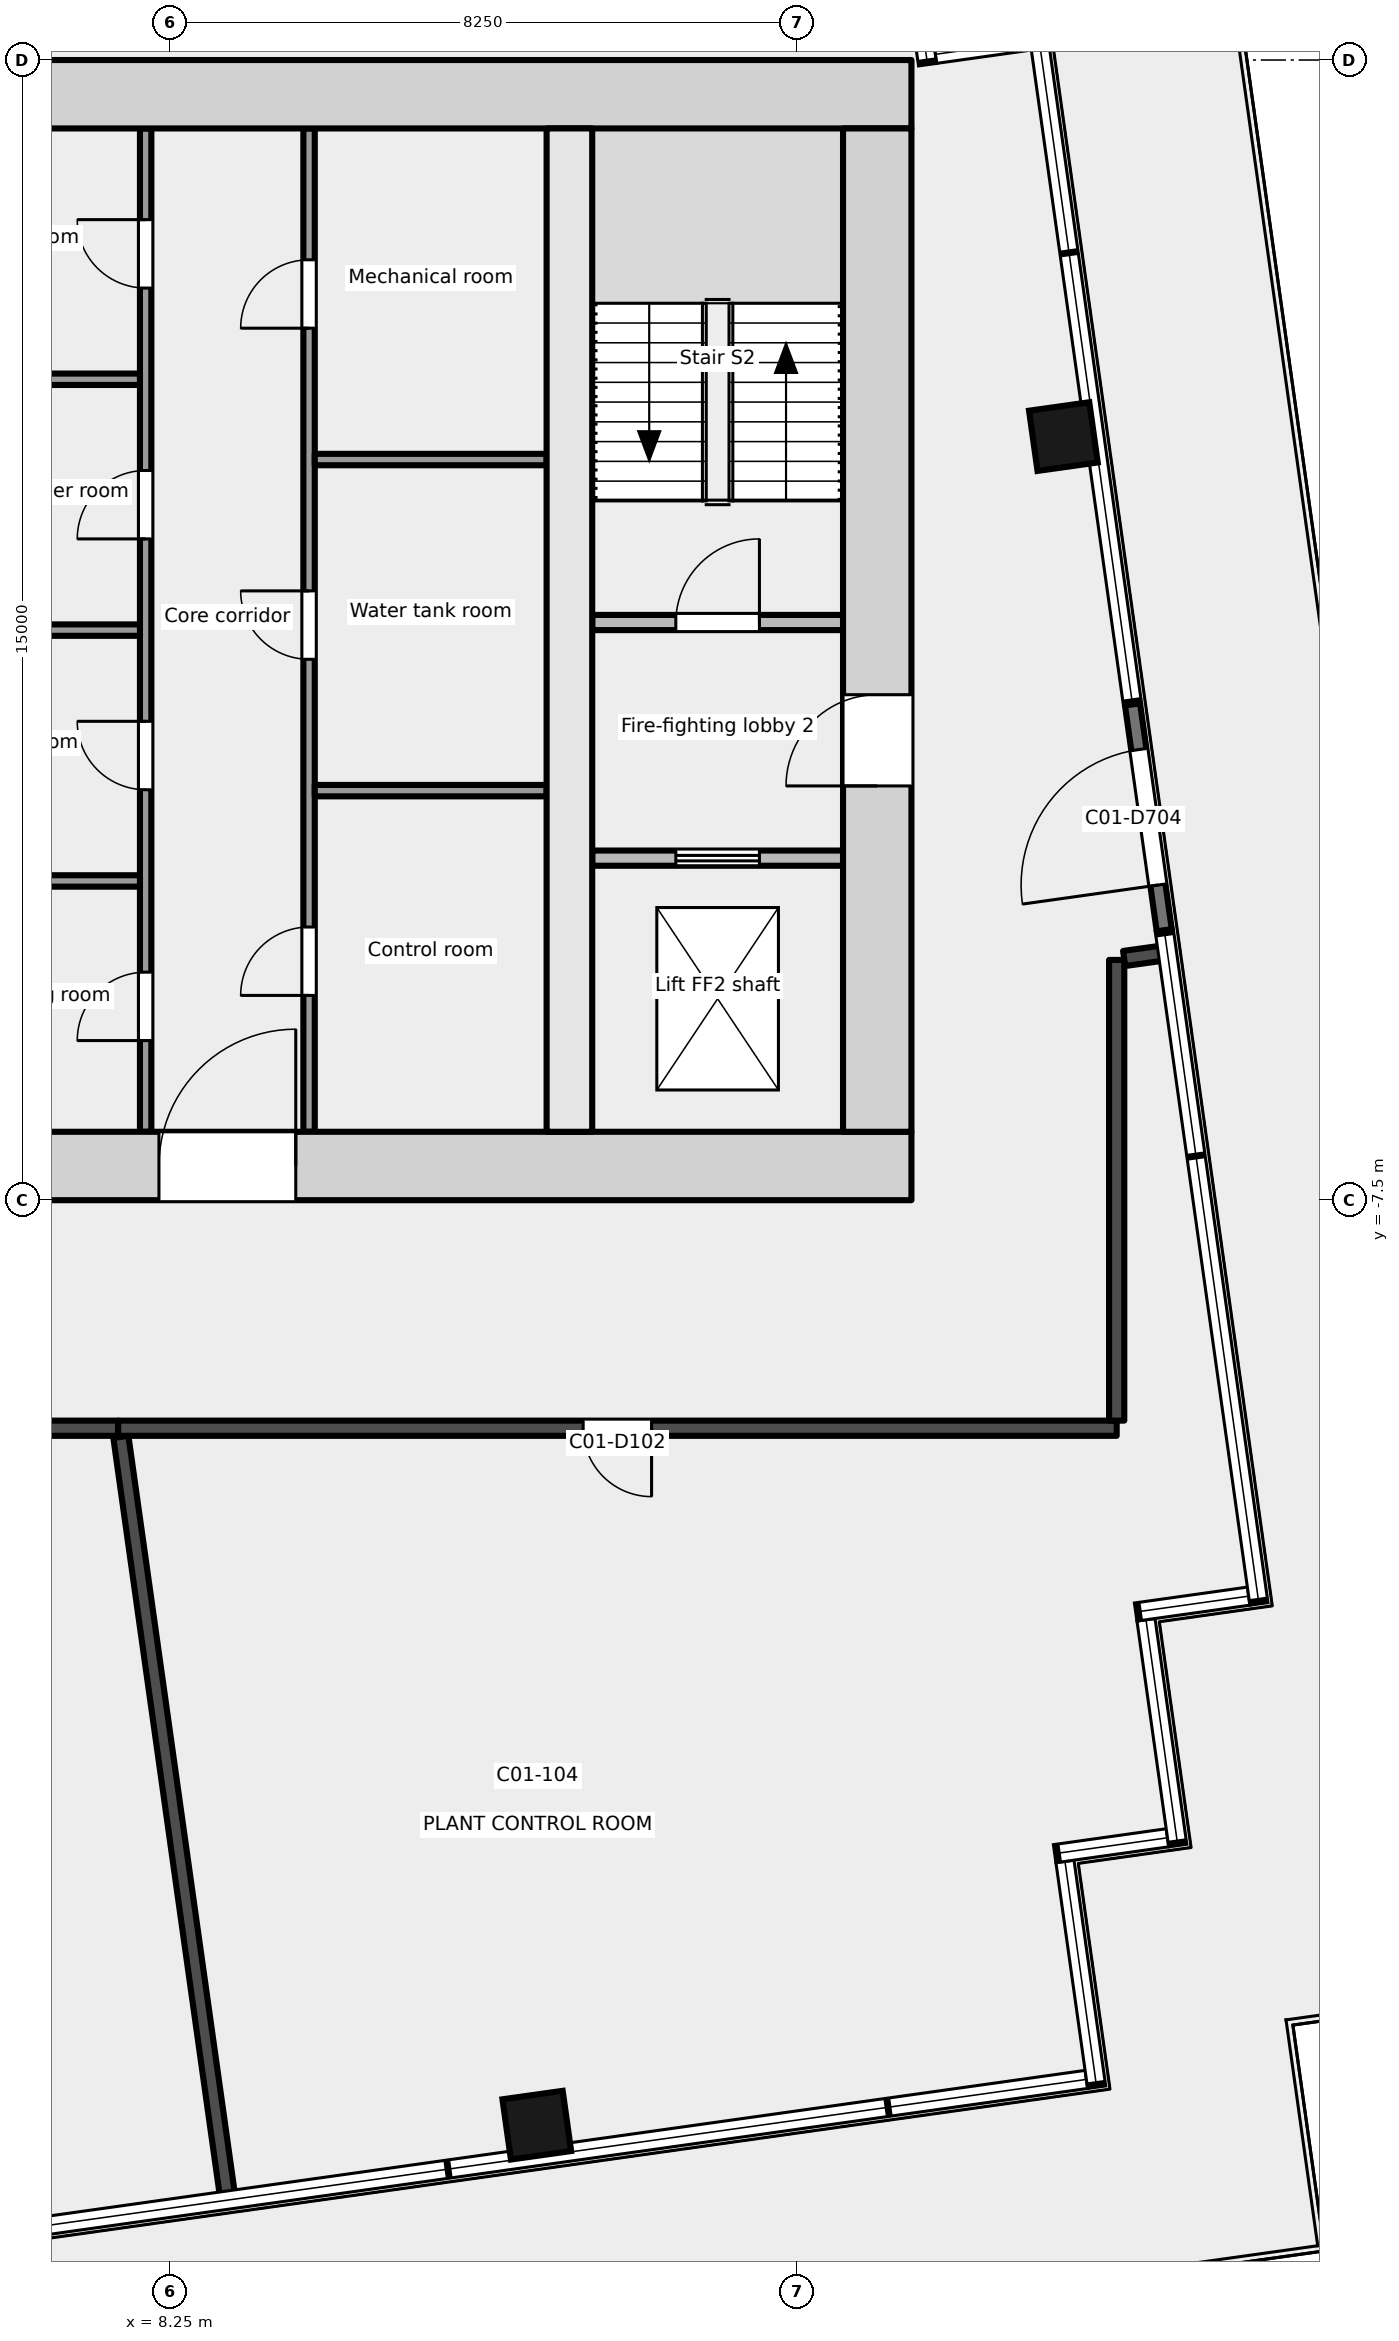
"""IFC4 building model, lengths in metres.
Left out: names, types, materials, properties, quantities, classifications, styles, units other than length and angle.
Written with IfcOpenShell. Run it as: python <this file> out.ifc"""

import sys

from ifc_helpers import new_model, si_unit, direction, frame, frame_2d, origin, origin_2d, place, context, subcontext, project, spatial, rectangle, extrude, element, fill, save


model = new_model("IFC4")
c1 = context("Model", 3, precision=1e-05, world=origin(), true_north=direction((0.0, 1.0)))
c2 = subcontext(c1, "Body", "Model", "MODEL_VIEW")
j1 = project(units=[si_unit("LENGTHUNIT", "METRE"), si_unit("PLANEANGLEUNIT", "RADIAN")], contexts=[c1])
p1 = place(None, origin())
s1 = spatial("IfcSite", under=j1, at=p1, CompositionType="ELEMENT")
p2 = place(p1, origin())
s2 = spatial("IfcBuilding", under=s1, at=p2, CompositionType="ELEMENT")
p3 = place(p2, frame((0.0, 0.0, 292.3)))
s3 = spatial("IfcBuildingStorey", under=s2, at=p3, CompositionType="ELEMENT", Elevation=292.3)
for number, where, z_axis, x_axis in (
    (1, (13.071, -19.669, -0.2), (0.0, 0.0, 1.0), (0.99, 0.139, 0.0)),
    (2, (19.999, 2.546, -0.2), (0.0, 0.0, 1.0), (-0.139, 0.99, 0.0)),
):
    element("IfcColumn", number, at=place(p3, frame(where, z_axis=z_axis, x_axis=x_axis)), inside=s3, PredefinedType="COLUMN", context=c2, shape_type="SweptSolid", body=[
        extrude(rectangle(XDim=0.8, YDim=0.8, at=origin_2d()), origin(), (0.0, 0.0, 1.0), 4.0),
    ])
p4 = place(p3, frame((21.326, -3.948, 0.0), z_axis=(0.0, 0.0, 1.0), x_axis=(-0.139165050317, 0.990269200152, 0.0)))
e3 = element("IfcWall", 3, at=p4, inside=s3, PredefinedType="SOLIDWALL", context=c2, shape_type="SweptSolid", body=[
    extrude(rectangle(XDim=3.0, YDim=0.2, at=frame_2d((1.5, 0.0))), origin(), (0.0, 0.0, 1.0), 3.8),
])
p5 = place(p4, frame((0.6, 0.0, 0.0)))
e4 = element("IfcOpeningElement", 4, at=p5, cuts=e3, PredefinedType="OPENING", context=c2, shape_type="SweptSolid", body=[
    extrude(rectangle(XDim=1.8, YDim=2.4, at=frame_2d((0.9, 1.2))), frame((0.0, 0.111, 0.0), z_axis=(0.0, -1.0, 0.0), x_axis=(1.0, 0.0, 0.0)), (0.0, 0.0, 1.0), 0.221),
])
p6 = place(p3, frame((-18.0, -7.05, -0.2), z_axis=(0.0, 0.0, 1.0), x_axis=(1.0, 0.0, 0.0)))
e5 = element("IfcWall", 5, at=p6, inside=s3, PredefinedType="SHEAR", context=c2, shape_type="SweptSolid", body=[
    extrude(rectangle(XDim=36.0, YDim=0.9, at=frame_2d((18.0, 0.0))), origin(), (0.0, 0.0, 1.0), 4.0),
])
p7 = place(p6, frame((8.1, 0.0, 0.2)))
e6 = element("IfcOpeningElement", 6, at=p7, cuts=e5, PredefinedType="OPENING", context=c2, shape_type="SweptSolid", body=[
    extrude(rectangle(XDim=1.8, YDim=2.1, at=frame_2d((0.9, 1.05))), frame((0.0, 0.46, 0.0), z_axis=(0.0, -1.0, 0.0), x_axis=(1.0, 0.0, 0.0)), (0.0, 0.0, 1.0), 0.921),
])
p8 = place(p6, frame((17.1, 0.0, 0.2)))
e7 = element("IfcOpeningElement", 7, at=p8, cuts=e5, PredefinedType="OPENING", context=c2, shape_type="SweptSolid", body=[
    extrude(rectangle(XDim=1.8, YDim=2.1, at=frame_2d((0.9, 1.05))), frame((0.0, 0.46, 0.0), z_axis=(0.0, -1.0, 0.0), x_axis=(1.0, 0.0, 0.0)), (0.0, 0.0, 1.0), 0.921),
])
p9 = place(p6, frame((26.1, 0.0, 0.2)))
e8 = element("IfcOpeningElement", 8, at=p9, cuts=e5, PredefinedType="OPENING", context=c2, shape_type="SweptSolid", body=[
    extrude(rectangle(XDim=1.8, YDim=2.1, at=frame_2d((0.9, 1.05))), frame((0.0, 0.46, 0.0), z_axis=(0.0, -1.0, 0.0), x_axis=(1.0, 0.0, 0.0)), (0.0, 0.0, 1.0), 0.921),
])
p10 = place(p3, frame((-18.0, 7.05, -0.2), z_axis=(0.0, 0.0, 1.0), x_axis=(1.0, 0.0, 0.0)))
e9 = element("IfcWall", 9, at=p10, inside=s3, PredefinedType="SHEAR", context=c2, shape_type="SweptSolid", body=[
    extrude(rectangle(XDim=36.0, YDim=0.9, at=frame_2d((18.0, 0.0))), origin(), (0.0, 0.0, 1.0), 4.0),
])
p11 = place(p3, frame((17.55, -6.6, -0.2), z_axis=(0.0, 0.0, 1.0), x_axis=(0.0, 1.0, 0.0)))
e10 = element("IfcWall", 10, at=p11, inside=s3, PredefinedType="SHEAR", context=c2, shape_type="SweptSolid", body=[
    extrude(rectangle(XDim=13.2, YDim=0.9, at=frame_2d((6.6, 0.0))), origin(), (0.0, 0.0, 1.0), 4.0),
])
p12 = place(p11, frame((4.55, 0.0, 0.2)))
e11 = element("IfcOpeningElement", 11, at=p12, cuts=e10, PredefinedType="OPENING", context=c2, shape_type="SweptSolid", body=[
    extrude(rectangle(XDim=1.2, YDim=2.1, at=frame_2d((0.6, 1.05))), frame((0.0, 0.46, 0.0), z_axis=(0.0, -1.0, 0.0), x_axis=(1.0, 0.0, 0.0)), (0.0, 0.0, 1.0), 0.921),
])
p13 = place(p3, frame((13.5, -6.6, -0.2), z_axis=(0.0, 0.0, 1.0), x_axis=(0.0, 1.0, 0.0)))
e12 = element("IfcWall", 12, at=p13, inside=s3, PredefinedType="SHEAR", context=c2, shape_type="SweptSolid", body=[
    extrude(rectangle(XDim=13.2, YDim=0.6, at=frame_2d((6.6, 0.0))), origin(), (0.0, 0.0, 1.0), 4.0),
])
p14 = place(p3, frame((13.8, -3.0, 0.0), z_axis=(0.0, 0.0, 1.0), x_axis=(1.0, 0.0, 0.0)))
e13 = element("IfcWall", 13, at=p14, inside=s3, PredefinedType="PARTITIONING", context=c2, shape_type="SweptSolid", body=[
    extrude(rectangle(XDim=3.3, YDim=0.2, at=frame_2d((1.65, 0.0))), origin(), (0.0, 0.0, 1.0), 3.8),
])
p15 = place(p14, frame((1.1, 0.0, 0.0)))
e14 = element("IfcOpeningElement", 14, at=p15, cuts=e13, PredefinedType="OPENING", context=c2, shape_type="SweptSolid", body=[
    extrude(rectangle(XDim=1.1, YDim=2.1, at=frame_2d((0.55, 1.05))), frame((0.0, 0.111, 0.0), z_axis=(0.0, -1.0, 0.0), x_axis=(1.0, 0.0, 0.0)), (0.0, 0.0, 1.0), 0.221),
])
p16 = place(p3, frame((13.8, 0.1, 0.0), z_axis=(0.0, 0.0, 1.0), x_axis=(1.0, 0.0, 0.0)))
e15 = element("IfcWall", 15, at=p16, inside=s3, PredefinedType="PARTITIONING", context=c2, shape_type="SweptSolid", body=[
    extrude(rectangle(XDim=3.3, YDim=0.2, at=frame_2d((1.65, 0.0))), origin(), (0.0, 0.0, 1.0), 3.8),
])
p17 = place(p16, frame((1.1, 0.0, 0.0)))
e16 = element("IfcOpeningElement", 16, at=p17, cuts=e15, PredefinedType="OPENING", context=c2, shape_type="SweptSolid", body=[
    extrude(rectangle(XDim=1.1, YDim=2.1, at=frame_2d((0.55, 1.05))), frame((0.0, 0.111, 0.0), z_axis=(0.0, -1.0, 0.0), x_axis=(1.0, 0.0, 0.0)), (0.0, 0.0, 1.0), 0.221),
])
p18 = place(p3, frame((7.925, -6.6, 0.0), z_axis=(0.0, 0.0, 1.0), x_axis=(0.0, 1.0, 0.0)))
e17 = element("IfcWall", 17, at=p18, inside=s3, PredefinedType="PARTITIONING", context=c2, shape_type="SweptSolid", body=[
    extrude(rectangle(XDim=13.2, YDim=0.15, at=frame_2d((6.6, 0.0))), origin(), (0.0, 0.0, 1.0), 3.8),
])
p19 = place(p18, frame((1.2, 0.0, 0.0)))
e18 = element("IfcOpeningElement", 18, at=p19, cuts=e17, PredefinedType="OPENING", context=c2, shape_type="SweptSolid", body=[
    extrude(rectangle(XDim=0.9, YDim=2.1, at=frame_2d((0.45, 1.05))), frame((0.0, 0.085, 0.0), z_axis=(0.0, -1.0, 0.0), x_axis=(1.0, 0.0, 0.0)), (0.0, 0.0, 1.0), 0.171),
])
p20 = place(p18, frame((4.5, 0.0, 0.0)))
e19 = element("IfcOpeningElement", 19, at=p20, cuts=e17, PredefinedType="OPENING", context=c2, shape_type="SweptSolid", body=[
    extrude(rectangle(XDim=0.9, YDim=2.1, at=frame_2d((0.45, 1.05))), frame((0.0, 0.085, 0.0), z_axis=(0.0, -1.0, 0.0), x_axis=(1.0, 0.0, 0.0)), (0.0, 0.0, 1.0), 0.171),
])
p21 = place(p18, frame((7.8, 0.0, 0.0)))
e20 = element("IfcOpeningElement", 20, at=p21, cuts=e17, PredefinedType="OPENING", context=c2, shape_type="SweptSolid", body=[
    extrude(rectangle(XDim=0.9, YDim=2.1, at=frame_2d((0.45, 1.05))), frame((0.0, 0.085, 0.0), z_axis=(0.0, -1.0, 0.0), x_axis=(1.0, 0.0, 0.0)), (0.0, 0.0, 1.0), 0.171),
])
p22 = place(p18, frame((11.1, 0.0, 0.0)))
e21 = element("IfcOpeningElement", 21, at=p22, cuts=e17, PredefinedType="OPENING", context=c2, shape_type="SweptSolid", body=[
    extrude(rectangle(XDim=0.9, YDim=2.1, at=frame_2d((0.45, 1.05))), frame((0.0, 0.085, 0.0), z_axis=(0.0, -1.0, 0.0), x_axis=(1.0, 0.0, 0.0)), (0.0, 0.0, 1.0), 0.171),
])
for number, where, z_axis, x_axis in (
    (22, (4.8, -3.3, 0.0), (0.0, 0.0, 1.0), (1.0, 0.0, 0.0)),
    (23, (4.8, 0.0, 0.0), (0.0, 0.0, 1.0), (1.0, 0.0, 0.0)),
    (24, (4.8, 3.3, 0.0), (0.0, 0.0, 1.0), (1.0, 0.0, 0.0)),
):
    element("IfcWall", number, at=place(p3, frame(where, z_axis=z_axis, x_axis=x_axis)), inside=s3, PredefinedType="PARTITIONING", context=c2, shape_type="SweptSolid", body=[
        extrude(rectangle(XDim=3.05, YDim=0.15, at=frame_2d((1.525, 0.0))), origin(), (0.0, 0.0, 1.0), 3.8),
    ])
p23 = place(p3, frame((10.075, -6.6, 0.0), z_axis=(0.0, 0.0, 1.0), x_axis=(0.0, 1.0, 0.0)))
e25 = element("IfcWall", 25, at=p23, inside=s3, PredefinedType="PARTITIONING", context=c2, shape_type="SweptSolid", body=[
    extrude(rectangle(XDim=13.2, YDim=0.15, at=frame_2d((6.6, 0.0))), origin(), (0.0, 0.0, 1.0), 3.8),
])
p24 = place(p23, frame((1.794, 0.0, 0.0)))
e26 = element("IfcOpeningElement", 26, at=p24, cuts=e25, PredefinedType="OPENING", context=c2, shape_type="SweptSolid", body=[
    extrude(rectangle(XDim=0.9, YDim=2.1, at=frame_2d((0.45, 1.05))), frame((0.0, 0.085, 0.0), z_axis=(0.0, -1.0, 0.0), x_axis=(1.0, 0.0, 0.0)), (0.0, 0.0, 1.0), 0.171),
])
p25 = place(p23, frame((6.216, 0.0, 0.0)))
e27 = element("IfcOpeningElement", 27, at=p25, cuts=e25, PredefinedType="OPENING", context=c2, shape_type="SweptSolid", body=[
    extrude(rectangle(XDim=0.9, YDim=2.1, at=frame_2d((0.45, 1.05))), frame((0.0, 0.085, 0.0), z_axis=(0.0, -1.0, 0.0), x_axis=(1.0, 0.0, 0.0)), (0.0, 0.0, 1.0), 0.171),
])
p26 = place(p23, frame((10.572, 0.0, 0.0)))
e28 = element("IfcOpeningElement", 28, at=p26, cuts=e25, PredefinedType="OPENING", context=c2, shape_type="SweptSolid", body=[
    extrude(rectangle(XDim=0.9, YDim=2.1, at=frame_2d((0.45, 1.05))), frame((0.0, 0.085, 0.0), z_axis=(0.0, -1.0, 0.0), x_axis=(1.0, 0.0, 0.0)), (0.0, 0.0, 1.0), 0.171),
])
for number, where, z_axis, x_axis in (
    (29, (10.15, -2.112, 0.0), (0.0, 0.0, 1.0), (1.0, 0.0, 0.0)),
    (30, (10.15, 2.244, 0.0), (0.0, 0.0, 1.0), (1.0, 0.0, 0.0)),
):
    element("IfcWall", number, at=place(p3, frame(where, z_axis=z_axis, x_axis=x_axis)), inside=s3, PredefinedType="PARTITIONING", context=c2, shape_type="SweptSolid", body=[
        extrude(rectangle(XDim=3.05, YDim=0.15, at=frame_2d((1.525, 0.0))), origin(), (0.0, 0.0, 1.0), 3.8),
    ])
p27 = place(p3, frame((7.563, -10.5, 0.0), z_axis=(0.0, 0.0, 1.0), x_axis=(-1.0, 0.0, 0.0)))
e31 = element("IfcWall", 31, at=p27, inside=s3, PredefinedType="PARTITIONING", context=c2, shape_type="SweptSolid", body=[
    extrude(rectangle(XDim=11.768, YDim=0.2, at=frame_2d((5.884, 0.0))), origin(), (0.0, 0.0, 1.0), 3.19),
])
p28 = place(p27, frame((5.434, 0.0, 0.0)))
e32 = element("IfcOpeningElement", 32, at=p28, cuts=e31, PredefinedType="OPENING", context=c2, shape_type="SweptSolid", body=[
    extrude(rectangle(XDim=0.9, YDim=2.1, at=frame_2d((0.45, 1.05))), frame((0.0, 0.111, 0.0), z_axis=(0.0, -1.0, 0.0), x_axis=(1.0, 0.0, 0.0)), (0.0, 0.0, 1.0), 0.221),
])
p29 = place(p3, frame((20.7, -10.5, 0.0), z_axis=(0.0, 0.0, 1.0), x_axis=(-1.0, 0.0, 0.0)))
e33 = element("IfcWall", 33, at=p29, inside=s3, PredefinedType="PARTITIONING", context=c2, shape_type="SweptSolid", body=[
    extrude(rectangle(XDim=13.137, YDim=0.2, at=frame_2d((6.568, 0.0))), origin(), (0.0, 0.0, 1.0), 3.19),
])
p30 = place(p29, frame((6.119, 0.0, 0.0)))
e34 = element("IfcOpeningElement", 34, at=p30, cuts=e33, PredefinedType="OPENING", context=c2, shape_type="SweptSolid", body=[
    extrude(rectangle(XDim=0.9, YDim=2.1, at=frame_2d((0.45, 1.05))), frame((0.0, 0.111, 0.0), z_axis=(0.0, -1.0, 0.0), x_axis=(1.0, 0.0, 0.0)), (0.0, 0.0, 1.0), 0.221),
])
p31 = place(p3, frame((20.7, -4.339, 0.0), z_axis=(0.0, 0.0, 1.0), x_axis=(0.0, -1.0, 0.0)))
e35 = element("IfcWall", 35, at=p31, inside=s3, PredefinedType="PARTITIONING", context=c2, shape_type="SweptSolid", body=[
    extrude(rectangle(XDim=6.061, YDim=0.2, at=frame_2d((3.03, 0.0))), origin(), (0.0, 0.0, 1.0), 3.8),
])
p32 = place(p3, frame((21.279, -4.253, 0.0), z_axis=(0.0, 0.0, 1.0), x_axis=(-0.990396892546, -0.138253373325, 0.0)))
e36 = element("IfcWall", 36, at=p32, inside=s3, PredefinedType="PARTITIONING", context=c2, shape_type="SweptSolid", body=[
    extrude(rectangle(XDim=0.486, YDim=0.2, at=frame_2d((0.243, 0.0))), origin(), (0.0, 0.0, 1.0), 3.8),
])
p33 = place(p3, frame((7.599, -10.614, 0.0), z_axis=(0.0, 0.0, 1.0), x_axis=(0.139131599901, -0.990273900448, 0.0)))
e37 = element("IfcWall", 37, at=p33, inside=s3, PredefinedType="PARTITIONING", context=c2, shape_type="SweptSolid", body=[
    extrude(rectangle(XDim=10.048, YDim=0.2, at=frame_2d((5.024, 0.0))), origin(), (0.0, 0.0, 1.0), 3.19),
])
p34 = place(p5, origin())
e38 = element("IfcDoor", 38, at=p34, inside=s3, OperationType="DOUBLE_DOOR_SINGLE_SWING", PredefinedType="DOOR", context=c2, shape_type="SweptSolid", body=[
    extrude(rectangle(XDim=1.8, YDim=2.4, at=frame_2d((0.9, 1.2))), frame((0.0, 0.025, 0.0), z_axis=(0.0, -1.0, 0.0), x_axis=(1.0, 0.0, 0.0)), (0.0, 0.0, 1.0), 0.05),
])
fill(e4, e38)
p35 = place(p15, origin())
e39 = element("IfcDoor", 39, at=p35, inside=s3, OperationType="DOUBLE_DOOR_SLIDING", PredefinedType="DOOR", context=c2, shape_type="SweptSolid", body=[
    extrude(rectangle(XDim=1.1, YDim=2.1, at=frame_2d((0.55, 1.05))), frame((0.0, 0.025, 0.0), z_axis=(0.0, -1.0, 0.0), x_axis=(1.0, 0.0, 0.0)), (0.0, 0.0, 1.0), 0.05),
])
fill(e14, e39)
p36 = place(p12, origin())
e40 = element("IfcDoor", 40, at=p36, inside=s3, OperationType="SINGLE_SWING_LEFT", PredefinedType="DOOR", context=c2, shape_type="SweptSolid", body=[
    extrude(rectangle(XDim=1.2, YDim=2.1, at=frame_2d((0.6, 1.05))), frame((0.0, 0.025, 0.0), z_axis=(0.0, -1.0, 0.0), x_axis=(1.0, 0.0, 0.0)), (0.0, 0.0, 1.0), 0.05),
])
fill(e11, e40)
p37 = place(p17, origin())
e41 = element("IfcDoor", 41, at=p37, inside=s3, OperationType="SINGLE_SWING_RIGHT", PredefinedType="DOOR", context=c2, shape_type="SweptSolid", body=[
    extrude(rectangle(XDim=1.1, YDim=2.1, at=frame_2d((0.55, 1.05))), frame((0.0, 0.025, 0.0), z_axis=(0.0, -1.0, 0.0), x_axis=(1.0, 0.0, 0.0)), (0.0, 0.0, 1.0), 0.05),
])
fill(e16, e41)
p38 = place(p19, origin())
e42 = element("IfcDoor", 42, at=p38, inside=s3, OperationType="SINGLE_SWING_LEFT", PredefinedType="DOOR", context=c2, shape_type="SweptSolid", body=[
    extrude(rectangle(XDim=0.9, YDim=2.1, at=frame_2d((0.45, 1.05))), frame((0.0, 0.025, 0.0), z_axis=(0.0, -1.0, 0.0), x_axis=(1.0, 0.0, 0.0)), (0.0, 0.0, 1.0), 0.05),
])
fill(e18, e42)
p39 = place(p20, origin())
e43 = element("IfcDoor", 43, at=p39, inside=s3, OperationType="SINGLE_SWING_RIGHT", PredefinedType="DOOR", context=c2, shape_type="SweptSolid", body=[
    extrude(rectangle(XDim=0.9, YDim=2.1, at=frame_2d((0.45, 1.05))), frame((0.0, 0.025, 0.0), z_axis=(0.0, -1.0, 0.0), x_axis=(1.0, 0.0, 0.0)), (0.0, 0.0, 1.0), 0.05),
])
fill(e19, e43)
p40 = place(p21, origin())
e44 = element("IfcDoor", 44, at=p40, inside=s3, OperationType="SINGLE_SWING_LEFT", PredefinedType="DOOR", context=c2, shape_type="SweptSolid", body=[
    extrude(rectangle(XDim=0.9, YDim=2.1, at=frame_2d((0.45, 1.05))), frame((0.0, 0.025, 0.0), z_axis=(0.0, -1.0, 0.0), x_axis=(1.0, 0.0, 0.0)), (0.0, 0.0, 1.0), 0.05),
])
fill(e20, e44)
p41 = place(p22, origin())
e45 = element("IfcDoor", 45, at=p41, inside=s3, OperationType="SINGLE_SWING_RIGHT", PredefinedType="DOOR", context=c2, shape_type="SweptSolid", body=[
    extrude(rectangle(XDim=0.9, YDim=2.1, at=frame_2d((0.45, 1.05))), frame((0.0, 0.025, 0.0), z_axis=(0.0, -1.0, 0.0), x_axis=(1.0, 0.0, 0.0)), (0.0, 0.0, 1.0), 0.05),
])
fill(e21, e45)
p42 = place(p24, origin())
e46 = element("IfcDoor", 46, at=p42, inside=s3, OperationType="SINGLE_SWING_LEFT", PredefinedType="DOOR", context=c2, shape_type="SweptSolid", body=[
    extrude(rectangle(XDim=0.9, YDim=2.1, at=frame_2d((0.45, 1.05))), frame((0.0, 0.025, 0.0), z_axis=(0.0, -1.0, 0.0), x_axis=(1.0, 0.0, 0.0)), (0.0, 0.0, 1.0), 0.05),
])
fill(e26, e46)
p43 = place(p25, origin())
e47 = element("IfcDoor", 47, at=p43, inside=s3, OperationType="SINGLE_SWING_RIGHT", PredefinedType="DOOR", context=c2, shape_type="SweptSolid", body=[
    extrude(rectangle(XDim=0.9, YDim=2.1, at=frame_2d((0.45, 1.05))), frame((0.0, 0.025, 0.0), z_axis=(0.0, -1.0, 0.0), x_axis=(1.0, 0.0, 0.0)), (0.0, 0.0, 1.0), 0.05),
])
fill(e27, e47)
p44 = place(p26, origin())
e48 = element("IfcDoor", 48, at=p44, inside=s3, OperationType="SINGLE_SWING_LEFT", PredefinedType="DOOR", context=c2, shape_type="SweptSolid", body=[
    extrude(rectangle(XDim=0.9, YDim=2.1, at=frame_2d((0.45, 1.05))), frame((0.0, 0.025, 0.0), z_axis=(0.0, -1.0, 0.0), x_axis=(1.0, 0.0, 0.0)), (0.0, 0.0, 1.0), 0.05),
])
fill(e28, e48)
p45 = place(p9, origin())
e49 = element("IfcDoor", 49, at=p45, inside=s3, OperationType="SINGLE_SWING_RIGHT", PredefinedType="DOOR", context=c2, shape_type="SweptSolid", body=[
    extrude(rectangle(XDim=1.8, YDim=2.1, at=frame_2d((0.9, 1.05))), frame((0.0, 0.025, 0.0), z_axis=(0.0, -1.0, 0.0), x_axis=(1.0, 0.0, 0.0)), (0.0, 0.0, 1.0), 0.05),
])
fill(e8, e49)
p46 = place(p30, origin())
e50 = element("IfcDoor", 50, at=p46, inside=s3, OperationType="SINGLE_SWING_LEFT", PredefinedType="DOOR", context=c2, shape_type="SweptSolid", body=[
    extrude(rectangle(XDim=0.9, YDim=2.1, at=frame_2d((0.45, 1.05))), frame((0.0, 0.025, 0.0), z_axis=(0.0, -1.0, 0.0), x_axis=(1.0, 0.0, 0.0)), (0.0, 0.0, 1.0), 0.05),
])
fill(e34, e50)
save(model, sys.argv[1])
